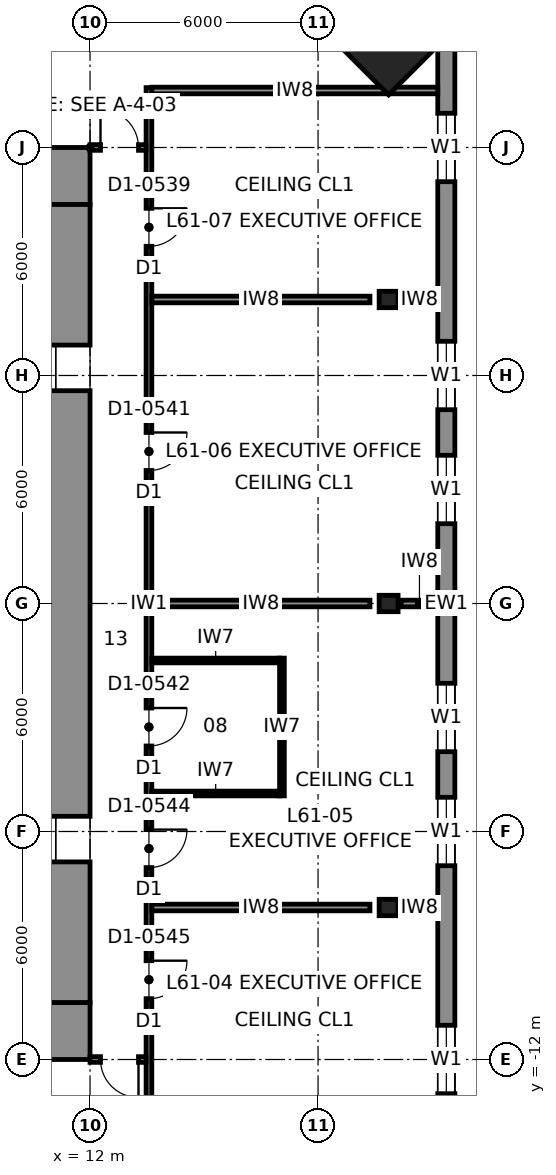
"""IFC4 building model, lengths in metres.
Left out: names, types, materials, properties, quantities, classifications, styles, units other than length and angle.
Written with IfcOpenShell. Run it as: python <this file> out.ifc"""

import sys

from ifc_helpers import new_model, si_unit, direction, frame, frame_2d, origin, origin_2d, place, context, subcontext, project, spatial, rectangle, i_section, extrude, element, fill, save


model = new_model("IFC4")
c1 = context("Model", 3, precision=1e-05, world=origin(), true_north=direction((0.0, 1.0)))
c2 = subcontext(c1, "Body", "Model", "MODEL_VIEW")
j1 = project(units=[si_unit("LENGTHUNIT", "METRE"), si_unit("PLANEANGLEUNIT", "RADIAN")], contexts=[c1])
p1 = place(None, origin())
s1 = spatial("IfcSite", under=j1, at=p1, CompositionType="ELEMENT")
p2 = place(p1, origin())
s2 = spatial("IfcBuilding", under=s1, at=p2, CompositionType="ELEMENT")
p3 = place(p2, frame((0.0, 0.0, 273.8)))
s3 = spatial("IfcBuildingStorey", under=s2, at=p3, CompositionType="ELEMENT", Elevation=273.8)
p4 = place(p3, frame((19.856, 15.506, 0.0), z_axis=(-0.040278830354, -0.040217894151, 0.998378754189), x_axis=(0.706571297296, -0.707641859868, 0.0)))
e1 = element("IfcColumn", 1, at=p4, inside=s3, PredefinedType="COLUMN", context=c2, shape_type="SweptSolid", body=[
    extrude(rectangle(XDim=3.0, YDim=3.0, at=origin_2d()), origin(), (0.0, 0.0, 1.0), 4.007),
])
for number, where, z_axis, x_axis in (
    (2, (19.856, 0.0, 0.0), (-0.04, 0.0, 0.999), (0.0, -1.0, 0.0)),
    (3, (19.856, -8.0, 0.0), (-0.04, 0.0, 0.999), (0.0, -1.0, 0.0)),
    (4, (19.856, 8.0, 0.0), (-0.04, 0.0, 0.999), (0.0, -1.0, 0.0)),
):
    element("IfcColumn", number, at=place(p3, frame(where, z_axis=z_axis, x_axis=x_axis)), inside=s3, PredefinedType="COLUMN", context=c2, shape_type="SweptSolid", body=[
        extrude(i_section(OverallWidth=0.432, OverallDepth=0.498, WebThickness=0.056, FlangeThickness=0.089, at=origin_2d()), origin(), (0.0, 0.0, 1.0), 4.003),
    ])
for number, where, z_axis, x_axis in (
    (5, (-12.0, 11.25, 0.0), (0.0, 0.0, 1.0), (1.0, 0.0, 0.0)),
    (6, (12.0, -11.25, 0.0), (0.0, 0.0, 1.0), (-1.0, 0.0, 0.0)),
):
    element("IfcWall", number, at=place(p3, frame(where, z_axis=z_axis, x_axis=x_axis)), inside=s3, PredefinedType="SHEAR", context=c2, shape_type="SweptSolid", body=[
        extrude(rectangle(XDim=24.0, YDim=1.5, at=frame_2d((12.0, 0.0))), origin(), (0.0, 0.0, 1.0), 4.0),
    ])
p5 = place(p3, frame((11.25, 10.5, 0.0), z_axis=(0.0, 0.0, 1.0), x_axis=(0.0, -1.0, 0.0)))
e7 = element("IfcWall", 7, at=p5, inside=s3, PredefinedType="SHEAR", context=c2, shape_type="SweptSolid", body=[
    extrude(rectangle(XDim=21.0, YDim=1.5, at=frame_2d((10.5, 0.0))), origin(), (0.0, 0.0, 1.0), 4.0),
])
p6 = place(p5, frame((3.7, 0.0, 0.0)))
e8 = element("IfcOpeningElement", 8, at=p6, cuts=e7, PredefinedType="OPENING", context=c2, shape_type="SweptSolid", body=[
    extrude(rectangle(XDim=1.2, YDim=2.3, at=frame_2d((0.6, 1.15))), frame((0.0, 0.76, 0.0), z_axis=(0.0, -1.0, 0.0), x_axis=(1.0, 0.0, 0.0)), (0.0, 0.0, 1.0), 1.52),
])
p7 = place(p5, frame((16.1, 0.0, 0.0)))
e9 = element("IfcOpeningElement", 9, at=p7, cuts=e7, PredefinedType="OPENING", context=c2, shape_type="SweptSolid", body=[
    extrude(rectangle(XDim=1.2, YDim=2.3, at=frame_2d((0.6, 1.15))), frame((0.0, 0.76, 0.0), z_axis=(0.0, -1.0, 0.0), x_axis=(1.0, 0.0, 0.0)), (0.0, 0.0, 1.0), 1.52),
])
p8 = place(p3, frame((21.375, -17.1, 0.0), z_axis=(0.0, 0.0, 1.0), x_axis=(0.0, 1.0, 0.0)))
e10 = element("IfcWall", 10, at=p8, inside=s3, PredefinedType="SOLIDWALL", context=c2, shape_type="SweptSolid", body=[
    extrude(rectangle(XDim=34.2, YDim=0.45, at=frame_2d((17.1, 0.0))), origin(), (0.0, 0.0, 1.0), 3.83),
])
p9 = place(p8, frame((4.2, 0.0, 0.7)))
e11 = element("IfcOpeningElement", 11, at=p9, cuts=e10, PredefinedType="OPENING", context=c2, shape_type="SweptSolid", body=[
    extrude(rectangle(XDim=1.8, YDim=2.6, at=frame_2d((0.9, 1.3))), frame((0.0, 0.235, 0.0), z_axis=(0.0, -1.0, 0.0), x_axis=(1.0, 0.0, 0.0)), (0.0, 0.0, 1.0), 0.47),
])
p10 = place(p8, frame((10.2, 0.0, 0.7)))
e12 = element("IfcOpeningElement", 12, at=p10, cuts=e10, PredefinedType="OPENING", context=c2, shape_type="SweptSolid", body=[
    extrude(rectangle(XDim=1.8, YDim=2.6, at=frame_2d((0.9, 1.3))), frame((0.0, 0.235, 0.0), z_axis=(0.0, -1.0, 0.0), x_axis=(1.0, 0.0, 0.0)), (0.0, 0.0, 1.0), 0.47),
])
p11 = place(p8, frame((13.2, 0.0, 0.7)))
e13 = element("IfcOpeningElement", 13, at=p11, cuts=e10, PredefinedType="OPENING", context=c2, shape_type="SweptSolid", body=[
    extrude(rectangle(XDim=1.8, YDim=2.6, at=frame_2d((0.9, 1.3))), frame((0.0, 0.235, 0.0), z_axis=(0.0, -1.0, 0.0), x_axis=(1.0, 0.0, 0.0)), (0.0, 0.0, 1.0), 0.47),
])
p12 = place(p8, frame((19.2, 0.0, 0.7)))
e14 = element("IfcOpeningElement", 14, at=p12, cuts=e10, PredefinedType="OPENING", context=c2, shape_type="SweptSolid", body=[
    extrude(rectangle(XDim=1.8, YDim=2.6, at=frame_2d((0.9, 1.3))), frame((0.0, 0.235, 0.0), z_axis=(0.0, -1.0, 0.0), x_axis=(1.0, 0.0, 0.0)), (0.0, 0.0, 1.0), 0.47),
])
p13 = place(p8, frame((22.2, 0.0, 0.7)))
e15 = element("IfcOpeningElement", 15, at=p13, cuts=e10, PredefinedType="OPENING", context=c2, shape_type="SweptSolid", body=[
    extrude(rectangle(XDim=1.8, YDim=2.6, at=frame_2d((0.9, 1.3))), frame((0.0, 0.235, 0.0), z_axis=(0.0, -1.0, 0.0), x_axis=(1.0, 0.0, 0.0)), (0.0, 0.0, 1.0), 0.47),
])
p14 = place(p8, frame((28.2, 0.0, 0.7)))
e16 = element("IfcOpeningElement", 16, at=p14, cuts=e10, PredefinedType="OPENING", context=c2, shape_type="SweptSolid", body=[
    extrude(rectangle(XDim=1.8, YDim=2.6, at=frame_2d((0.9, 1.3))), frame((0.0, 0.235, 0.0), z_axis=(0.0, -1.0, 0.0), x_axis=(1.0, 0.0, 0.0)), (0.0, 0.0, 1.0), 0.47),
])
p15 = place(p3, frame((13.55, -13.575, 0.0), z_axis=(0.0, 0.0, 1.0), x_axis=(0.0, 1.0, 0.0)))
e17 = element("IfcWall", 17, at=p15, inside=s3, PredefinedType="PARTITIONING", context=c2, shape_type="SweptSolid", body=[
    extrude(rectangle(XDim=27.15, YDim=0.15, at=frame_2d((13.575, 0.0))), origin(), (0.0, 0.0, 1.0), 3.83),
])
p16 = place(p15, frame((3.175, 0.0, 0.0)))
e18 = element("IfcOpeningElement", 18, at=p16, cuts=e17, PredefinedType="OPENING", context=c2, shape_type="SweptSolid", body=[
    extrude(rectangle(XDim=1.0, YDim=2.3, at=frame_2d((0.5, 1.15))), frame((0.0, 0.085, 0.0), z_axis=(0.0, -1.0, 0.0), x_axis=(1.0, 0.0, 0.0)), (0.0, 0.0, 1.0), 0.17),
])
p17 = place(p15, frame((6.625, 0.0, 0.0)))
e19 = element("IfcOpeningElement", 19, at=p17, cuts=e17, PredefinedType="OPENING", context=c2, shape_type="SweptSolid", body=[
    extrude(rectangle(XDim=1.0, YDim=2.3, at=frame_2d((0.5, 1.15))), frame((0.0, 0.085, 0.0), z_axis=(0.0, -1.0, 0.0), x_axis=(1.0, 0.0, 0.0)), (0.0, 0.0, 1.0), 0.17),
])
p18 = place(p15, frame((17.075, 0.0, 0.0)))
e20 = element("IfcOpeningElement", 20, at=p18, cuts=e17, PredefinedType="OPENING", context=c2, shape_type="SweptSolid", body=[
    extrude(rectangle(XDim=1.0, YDim=2.3, at=frame_2d((0.5, 1.15))), frame((0.0, 0.085, 0.0), z_axis=(0.0, -1.0, 0.0), x_axis=(1.0, 0.0, 0.0)), (0.0, 0.0, 1.0), 0.17),
])
p19 = place(p15, frame((22.975, 0.0, 0.0)))
e21 = element("IfcOpeningElement", 21, at=p19, cuts=e17, PredefinedType="OPENING", context=c2, shape_type="SweptSolid", body=[
    extrude(rectangle(XDim=1.0, YDim=2.3, at=frame_2d((0.5, 1.15))), frame((0.0, 0.085, 0.0), z_axis=(0.0, -1.0, 0.0), x_axis=(1.0, 0.0, 0.0)), (0.0, 0.0, 1.0), 0.17),
])
p20 = place(p15, frame((9.825, 0.0, 0.0)))
e22 = element("IfcOpeningElement", 22, at=p20, cuts=e17, PredefinedType="OPENING", context=c2, shape_type="SweptSolid", body=[
    extrude(rectangle(XDim=1.0, YDim=2.3, at=frame_2d((0.5, 1.15))), frame((0.0, 0.085, 0.0), z_axis=(0.0, -1.0, 0.0), x_axis=(1.0, 0.0, 0.0)), (0.0, 0.0, 1.0), 0.17),
])
p21 = place(p3, frame((12.0, 12.0, 0.0), z_axis=(0.0, 0.0, 1.0), x_axis=(1.0, 0.0, 0.0)))
e23 = element("IfcWall", 23, at=p21, inside=s3, PredefinedType="PARTITIONING", context=c2, shape_type="SweptSolid", body=[
    extrude(rectangle(XDim=1.475, YDim=0.15, at=frame_2d((0.738, 0.0))), origin(), (0.0, 0.0, 1.0), 3.83),
])
p22 = place(p21, frame((0.275, 0.0, 0.0)))
e24 = element("IfcOpeningElement", 24, at=p22, cuts=e23, PredefinedType="OPENING", context=c2, shape_type="SweptSolid", body=[
    extrude(rectangle(XDim=1.0, YDim=2.3, at=frame_2d((0.5, 1.15))), frame((0.0, 0.085, 0.0), z_axis=(0.0, -1.0, 0.0), x_axis=(1.0, 0.0, 0.0)), (0.0, 0.0, 1.0), 0.17),
])
p23 = place(p3, frame((13.475, -12.0, 0.0), z_axis=(0.0, 0.0, 1.0), x_axis=(-1.0, 0.0, 0.0)))
e25 = element("IfcWall", 25, at=p23, inside=s3, PredefinedType="PARTITIONING", context=c2, shape_type="SweptSolid", body=[
    extrude(rectangle(XDim=1.475, YDim=0.15, at=frame_2d((0.738, 0.0))), origin(), (0.0, 0.0, 1.0), 3.83),
])
p24 = place(p23, frame((0.2, 0.0, 0.0)))
e26 = element("IfcOpeningElement", 26, at=p24, cuts=e25, PredefinedType="OPENING", context=c2, shape_type="SweptSolid", body=[
    extrude(rectangle(XDim=1.0, YDim=2.3, at=frame_2d((0.5, 1.15))), frame((0.0, 0.085, 0.0), z_axis=(0.0, -1.0, 0.0), x_axis=(1.0, 0.0, 0.0)), (0.0, 0.0, 1.0), 0.17),
])
p25 = place(p3, frame((13.625, 13.5, 0.0), z_axis=(0.0, 0.0, 1.0), x_axis=(1.0, 0.0, 0.0)))
e27 = element("IfcWall", 27, at=p25, inside=s3, PredefinedType="PARTITIONING", context=c2, shape_type="SweptSolid", body=[
    extrude(rectangle(XDim=7.525, YDim=0.175, at=frame_2d((3.762, 0.0))), origin(), (0.0, 0.0, 1.0), 3.83),
])
p26 = place(p3, frame((13.625, -8.0, 0.0), z_axis=(0.0, 0.0, 1.0), x_axis=(1.0, 0.0, 0.0)))
e28 = element("IfcWall", 28, at=p26, inside=s3, PredefinedType="PARTITIONING", context=c2, shape_type="SweptSolid", body=[
    extrude(rectangle(XDim=5.74, YDim=0.175, at=frame_2d((2.87, 0.0))), origin(), (0.0, 0.0, 1.0), 3.24),
])
p27 = place(p3, frame((20.186, -8.0, 0.0), z_axis=(0.0, 0.0, 1.0), x_axis=(1.0, 0.0, 0.0)))
e29 = element("IfcWall", 29, at=p27, inside=s3, PredefinedType="PARTITIONING", context=c2, shape_type="SweptSolid", body=[
    extrude(rectangle(XDim=0.964, YDim=0.175, at=frame_2d((0.482, 0.0))), origin(), (0.0, 0.0, 1.0), 3.83),
])
p28 = place(p3, frame((13.625, 0.0, 0.0), z_axis=(0.0, 0.0, 1.0), x_axis=(1.0, 0.0, 0.0)))
e30 = element("IfcWall", 30, at=p28, inside=s3, PredefinedType="PARTITIONING", context=c2, shape_type="SweptSolid", body=[
    extrude(rectangle(XDim=5.74, YDim=0.175, at=frame_2d((2.87, 0.0))), origin(), (0.0, 0.0, 1.0), 3.24),
])
p29 = place(p3, frame((20.186, 0.0, 0.0), z_axis=(0.0, 0.0, 1.0), x_axis=(1.0, 0.0, 0.0)))
e31 = element("IfcWall", 31, at=p29, inside=s3, PredefinedType="PARTITIONING", context=c2, shape_type="SweptSolid", body=[
    extrude(rectangle(XDim=0.964, YDim=0.175, at=frame_2d((0.482, 0.0))), origin(), (0.0, 0.0, 1.0), 3.83),
])
p30 = place(p3, frame((13.625, 8.0, 0.0), z_axis=(0.0, 0.0, 1.0), x_axis=(1.0, 0.0, 0.0)))
e32 = element("IfcWall", 32, at=p30, inside=s3, PredefinedType="PARTITIONING", context=c2, shape_type="SweptSolid", body=[
    extrude(rectangle(XDim=5.74, YDim=0.175, at=frame_2d((2.87, 0.0))), origin(), (0.0, 0.0, 1.0), 3.24),
])
p31 = place(p3, frame((20.186, 8.0, 0.0), z_axis=(0.0, 0.0, 1.0), x_axis=(1.0, 0.0, 0.0)))
e33 = element("IfcWall", 33, at=p31, inside=s3, PredefinedType="PARTITIONING", context=c2, shape_type="SweptSolid", body=[
    extrude(rectangle(XDim=0.964, YDim=0.175, at=frame_2d((0.482, 0.0))), origin(), (0.0, 0.0, 1.0), 3.83),
])
p32 = place(p3, frame((17.05, -5.062, 0.0), z_axis=(0.0, 0.0, 1.0), x_axis=(0.0, 1.0, 0.0)))
e34 = element("IfcWall", 34, at=p32, inside=s3, PredefinedType="PARTITIONING", context=c2, shape_type="SweptSolid", body=[
    extrude(rectangle(XDim=3.625, YDim=0.125, at=frame_2d((1.812, 0.0))), origin(), (0.0, 0.0, 1.0), 3.83),
])
for number, where, z_axis, x_axis in (
    (35, (13.625, -5.0, 0.0), (0.0, 0.0, 1.0), (1.0, 0.0, 0.0)),
    (36, (13.625, -1.5, 0.0), (0.0, 0.0, 1.0), (1.0, 0.0, 0.0)),
):
    element("IfcWall", number, at=place(p3, frame(where, z_axis=z_axis, x_axis=x_axis)), inside=s3, PredefinedType="PARTITIONING", context=c2, shape_type="SweptSolid", body=[
        extrude(rectangle(XDim=3.363, YDim=0.125, at=frame_2d((1.681, 0.0))), origin(), (0.0, 0.0, 1.0), 3.83),
    ])
p33 = place(p9, origin())
e37 = element("IfcWindow", 37, at=p33, inside=s3, PartitioningType="SINGLE_PANEL", PredefinedType="WINDOW", context=c2, shape_type="SweptSolid", body=[
    extrude(rectangle(XDim=1.8, YDim=2.6, at=frame_2d((0.9, 1.3))), frame((0.0, 0.03, 0.0), z_axis=(0.0, -1.0, 0.0), x_axis=(1.0, 0.0, 0.0)), (0.0, 0.0, 1.0), 0.06),
])
fill(e11, e37)
p34 = place(p10, origin())
e38 = element("IfcWindow", 38, at=p34, inside=s3, PartitioningType="SINGLE_PANEL", PredefinedType="WINDOW", context=c2, shape_type="SweptSolid", body=[
    extrude(rectangle(XDim=1.8, YDim=2.6, at=frame_2d((0.9, 1.3))), frame((0.0, 0.03, 0.0), z_axis=(0.0, -1.0, 0.0), x_axis=(1.0, 0.0, 0.0)), (0.0, 0.0, 1.0), 0.06),
])
fill(e12, e38)
p35 = place(p11, origin())
e39 = element("IfcWindow", 39, at=p35, inside=s3, PartitioningType="SINGLE_PANEL", PredefinedType="WINDOW", context=c2, shape_type="SweptSolid", body=[
    extrude(rectangle(XDim=1.8, YDim=2.6, at=frame_2d((0.9, 1.3))), frame((0.0, 0.03, 0.0), z_axis=(0.0, -1.0, 0.0), x_axis=(1.0, 0.0, 0.0)), (0.0, 0.0, 1.0), 0.06),
])
fill(e13, e39)
p36 = place(p12, origin())
e40 = element("IfcWindow", 40, at=p36, inside=s3, PartitioningType="SINGLE_PANEL", PredefinedType="WINDOW", context=c2, shape_type="SweptSolid", body=[
    extrude(rectangle(XDim=1.8, YDim=2.6, at=frame_2d((0.9, 1.3))), frame((0.0, 0.03, 0.0), z_axis=(0.0, -1.0, 0.0), x_axis=(1.0, 0.0, 0.0)), (0.0, 0.0, 1.0), 0.06),
])
fill(e14, e40)
p37 = place(p13, origin())
e41 = element("IfcWindow", 41, at=p37, inside=s3, PartitioningType="SINGLE_PANEL", PredefinedType="WINDOW", context=c2, shape_type="SweptSolid", body=[
    extrude(rectangle(XDim=1.8, YDim=2.6, at=frame_2d((0.9, 1.3))), frame((0.0, 0.03, 0.0), z_axis=(0.0, -1.0, 0.0), x_axis=(1.0, 0.0, 0.0)), (0.0, 0.0, 1.0), 0.06),
])
fill(e15, e41)
p38 = place(p14, origin())
e42 = element("IfcWindow", 42, at=p38, inside=s3, PartitioningType="SINGLE_PANEL", PredefinedType="WINDOW", context=c2, shape_type="SweptSolid", body=[
    extrude(rectangle(XDim=1.8, YDim=2.6, at=frame_2d((0.9, 1.3))), frame((0.0, 0.03, 0.0), z_axis=(0.0, -1.0, 0.0), x_axis=(1.0, 0.0, 0.0)), (0.0, 0.0, 1.0), 0.06),
])
fill(e16, e42)
p39 = place(p22, origin())
e43 = element("IfcDoor", 43, at=p39, inside=s3, OperationType="SINGLE_SWING_LEFT", PredefinedType="DOOR", context=c2, shape_type="SweptSolid", body=[
    extrude(rectangle(XDim=1.0, YDim=2.3, at=frame_2d((0.5, 1.15))), frame((0.0, 0.025, 0.0), z_axis=(0.0, -1.0, 0.0), x_axis=(1.0, 0.0, 0.0)), (0.0, 0.0, 1.0), 0.05),
])
fill(e24, e43)
p40 = place(p24, origin())
e44 = element("IfcDoor", 44, at=p40, inside=s3, OperationType="SINGLE_SWING_LEFT", PredefinedType="DOOR", context=c2, shape_type="SweptSolid", body=[
    extrude(rectangle(XDim=1.0, YDim=2.3, at=frame_2d((0.5, 1.15))), frame((0.0, 0.025, 0.0), z_axis=(0.0, -1.0, 0.0), x_axis=(1.0, 0.0, 0.0)), (0.0, 0.0, 1.0), 0.05),
])
fill(e26, e44)
p41 = place(p16, frame((1.0, 0.0, 0.0), z_axis=(0.0, 0.0, 1.0), x_axis=(-1.0, 0.0, 0.0)))
e45 = element("IfcDoor", 45, at=p41, inside=s3, OperationType="SINGLE_SWING_LEFT", PredefinedType="DOOR", context=c2, shape_type="SweptSolid", body=[
    extrude(rectangle(XDim=1.0, YDim=2.3, at=frame_2d((0.5, 1.15))), frame((0.0, 0.025, 0.0), z_axis=(0.0, -1.0, 0.0), x_axis=(1.0, 0.0, 0.0)), (0.0, 0.0, 1.0), 0.05),
])
fill(e18, e45)
p42 = place(p17, frame((1.0, 0.0, 0.0), z_axis=(0.0, 0.0, 1.0), x_axis=(-1.0, 0.0, 0.0)))
e46 = element("IfcDoor", 46, at=p42, inside=s3, OperationType="SINGLE_SWING_LEFT", PredefinedType="DOOR", context=c2, shape_type="SweptSolid", body=[
    extrude(rectangle(XDim=1.0, YDim=2.3, at=frame_2d((0.5, 1.15))), frame((0.0, 0.025, 0.0), z_axis=(0.0, -1.0, 0.0), x_axis=(1.0, 0.0, 0.0)), (0.0, 0.0, 1.0), 0.05),
])
fill(e19, e46)
p43 = place(p18, frame((1.0, 0.0, 0.0), z_axis=(0.0, 0.0, 1.0), x_axis=(-1.0, 0.0, 0.0)))
e47 = element("IfcDoor", 47, at=p43, inside=s3, OperationType="SINGLE_SWING_LEFT", PredefinedType="DOOR", context=c2, shape_type="SweptSolid", body=[
    extrude(rectangle(XDim=1.0, YDim=2.3, at=frame_2d((0.5, 1.15))), frame((0.0, 0.025, 0.0), z_axis=(0.0, -1.0, 0.0), x_axis=(1.0, 0.0, 0.0)), (0.0, 0.0, 1.0), 0.05),
])
fill(e20, e47)
p44 = place(p19, frame((1.0, 0.0, 0.0), z_axis=(0.0, 0.0, 1.0), x_axis=(-1.0, 0.0, 0.0)))
e48 = element("IfcDoor", 48, at=p44, inside=s3, OperationType="SINGLE_SWING_LEFT", PredefinedType="DOOR", context=c2, shape_type="SweptSolid", body=[
    extrude(rectangle(XDim=1.0, YDim=2.3, at=frame_2d((0.5, 1.15))), frame((0.0, 0.025, 0.0), z_axis=(0.0, -1.0, 0.0), x_axis=(1.0, 0.0, 0.0)), (0.0, 0.0, 1.0), 0.05),
])
fill(e21, e48)
p45 = place(p20, frame((1.0, 0.0, 0.0), z_axis=(0.0, 0.0, 1.0), x_axis=(-1.0, 0.0, 0.0)))
e49 = element("IfcDoor", 49, at=p45, inside=s3, OperationType="SINGLE_SWING_LEFT", PredefinedType="DOOR", context=c2, shape_type="SweptSolid", body=[
    extrude(rectangle(XDim=1.0, YDim=2.3, at=frame_2d((0.5, 1.15))), frame((0.0, 0.025, 0.0), z_axis=(0.0, -1.0, 0.0), x_axis=(1.0, 0.0, 0.0)), (0.0, 0.0, 1.0), 0.05),
])
fill(e22, e49)
p46 = place(p6, frame((1.2, 0.0, 0.0), z_axis=(0.0, 0.0, 1.0), x_axis=(-1.0, 0.0, 0.0)))
e50 = element("IfcDoor", 50, at=p46, inside=s3, OperationType="SINGLE_SWING_LEFT", PredefinedType="DOOR", context=c2, shape_type="SweptSolid", body=[
    extrude(rectangle(XDim=1.2, YDim=2.3, at=frame_2d((0.6, 1.15))), frame((0.0, 0.025, 0.0), z_axis=(0.0, -1.0, 0.0), x_axis=(1.0, 0.0, 0.0)), (0.0, 0.0, 1.0), 0.05),
])
fill(e8, e50)
p47 = place(p7, frame((1.2, 0.0, 0.0), z_axis=(0.0, 0.0, 1.0), x_axis=(-1.0, 0.0, 0.0)))
e51 = element("IfcDoor", 51, at=p47, inside=s3, OperationType="SINGLE_SWING_LEFT", PredefinedType="DOOR", context=c2, shape_type="SweptSolid", body=[
    extrude(rectangle(XDim=1.2, YDim=2.3, at=frame_2d((0.6, 1.15))), frame((0.0, 0.025, 0.0), z_axis=(0.0, -1.0, 0.0), x_axis=(1.0, 0.0, 0.0)), (0.0, 0.0, 1.0), 0.05),
])
fill(e9, e51)
save(model, sys.argv[1])
